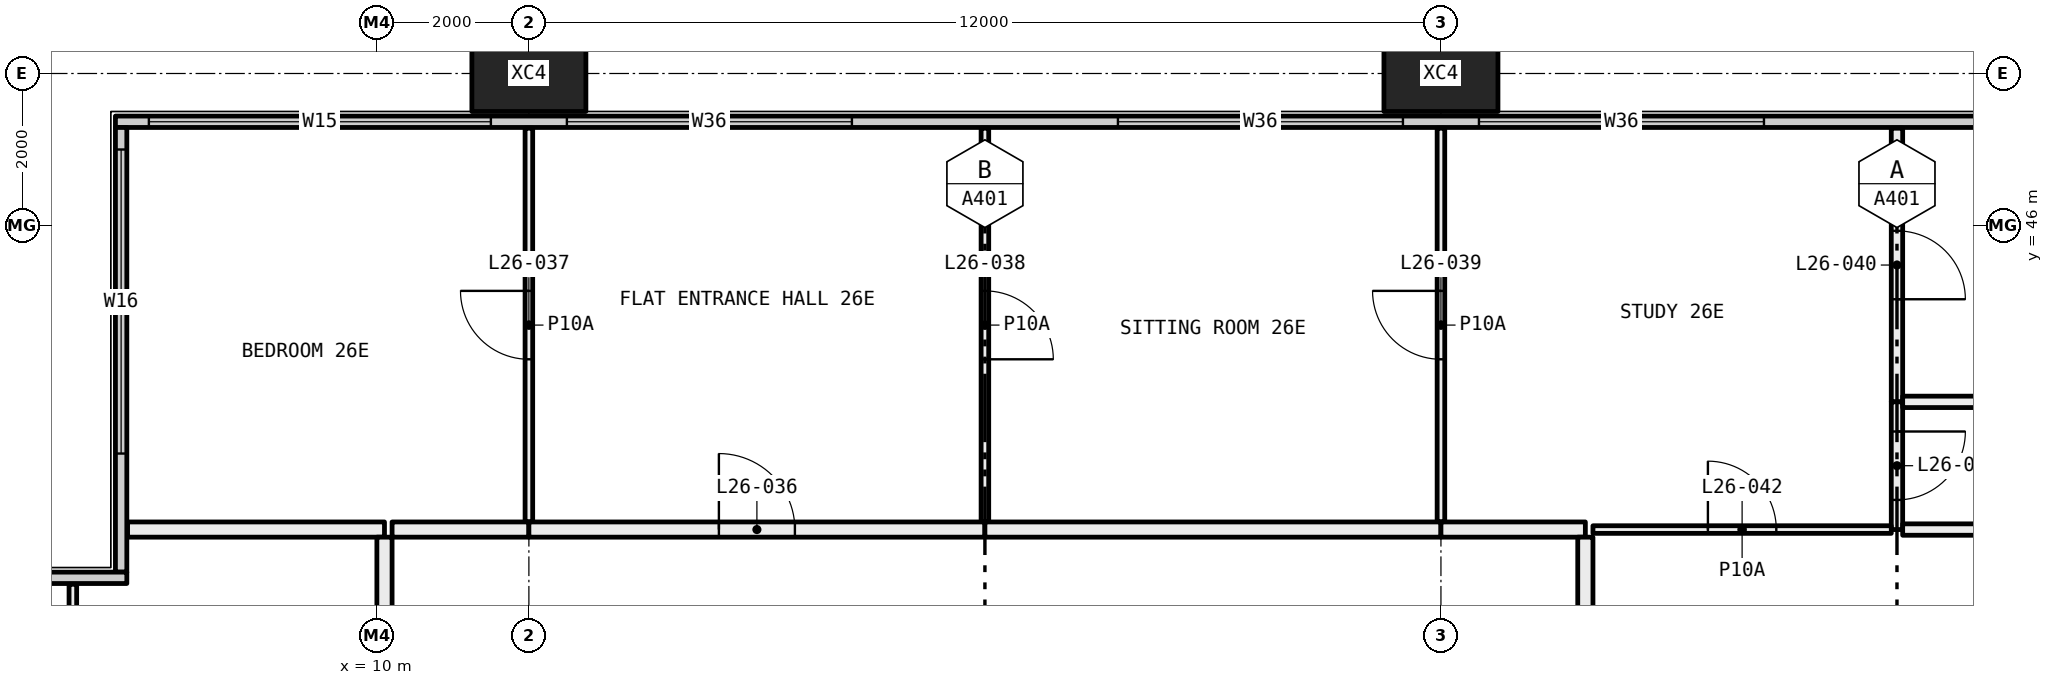
"""IFC4 building model, lengths in metres.
Left out: names, types, materials, properties, quantities, classifications, styles, units other than length and angle.
Written with IfcOpenShell. Run it as: python <this file> out.ifc"""

import sys

from ifc_helpers import new_model, si_unit, direction, frame, frame_2d, origin, origin_2d, place, context, subcontext, project, spatial, rectangle, hollow_rectangle, extrude, element, fill, save


model = new_model("IFC4")
c1 = context("Model", 3, precision=1e-05, world=origin(), true_north=direction((0.0, 1.0)))
c2 = subcontext(c1, "Body", "Model", "MODEL_VIEW")
j1 = project(units=[si_unit("LENGTHUNIT", "METRE"), si_unit("PLANEANGLEUNIT", "RADIAN")], contexts=[c1])
p1 = place(None, origin())
s1 = spatial("IfcSite", under=j1, at=p1, CompositionType="ELEMENT")
p2 = place(p1, origin())
s2 = spatial("IfcBuilding", under=s1, at=p2, CompositionType="ELEMENT")
p3 = place(p2, frame((0.0, 0.0, 103.5)))
s3 = spatial("IfcBuildingStorey", under=s2, at=p3, CompositionType="ELEMENT", Elevation=103.5)
for number, where, z_axis, x_axis in (
    (1, (12.0, 48.0, -0.4), (0.0, 0.0, 1.0), (1.0, 0.0, 0.0)),
    (2, (24.0, 48.0, -0.4), (0.0, 0.0, 1.0), (1.0, 0.0, 0.0)),
):
    element("IfcColumn", number, at=place(p3, frame(where, z_axis=z_axis, x_axis=x_axis)), inside=s3, PredefinedType="COLUMN", context=c2, shape_type="SweptSolid", body=[
        extrude(hollow_rectangle(XDim=1.5, YDim=1.0, WallThickness=0.06, at=origin_2d()), origin(), (0.0, 0.0, 1.0), 3.45),
    ])
p4 = place(p3, frame((6.56, 47.365, 0.0), z_axis=(0.0, 0.0, 1.0), x_axis=(1.0, 0.0, 0.0)))
e3 = element("IfcWall", 3, at=p4, inside=s3, PredefinedType="ELEMENTEDWALL", context=c2, shape_type="SweptSolid", body=[
    extrude(rectangle(XDim=58.88, YDim=0.15, at=frame_2d((29.44, 0.0))), origin(), (0.0, 0.0, 1.0), 3.05),
])
p5 = place(p4, frame((0.44, 0.0, 0.45)))
e4 = element("IfcOpeningElement", 4, at=p5, cuts=e3, PredefinedType="OPENING", context=c2, shape_type="SweptSolid", body=[
    extrude(rectangle(XDim=4.5, YDim=2.55, at=frame_2d((2.25, 1.275))), frame((0.0, 0.085, 0.0), z_axis=(0.0, -1.0, 0.0), x_axis=(1.0, 0.0, 0.0)), (0.0, 0.0, 1.0), 0.17),
])
p6 = place(p4, frame((5.94, 0.0, 0.45)))
e5 = element("IfcOpeningElement", 5, at=p6, cuts=e3, PredefinedType="OPENING", context=c2, shape_type="SweptSolid", body=[
    extrude(rectangle(XDim=3.75, YDim=2.55, at=frame_2d((1.875, 1.275))), frame((0.0, 0.085, 0.0), z_axis=(0.0, -1.0, 0.0), x_axis=(1.0, 0.0, 0.0)), (0.0, 0.0, 1.0), 0.17),
])
p7 = place(p4, frame((13.19, 0.0, 0.45)))
e6 = element("IfcOpeningElement", 6, at=p7, cuts=e3, PredefinedType="OPENING", context=c2, shape_type="SweptSolid", body=[
    extrude(rectangle(XDim=3.75, YDim=2.55, at=frame_2d((1.875, 1.275))), frame((0.0, 0.085, 0.0), z_axis=(0.0, -1.0, 0.0), x_axis=(1.0, 0.0, 0.0)), (0.0, 0.0, 1.0), 0.17),
])
p8 = place(p4, frame((17.94, 0.0, 0.45)))
e7 = element("IfcOpeningElement", 7, at=p8, cuts=e3, PredefinedType="OPENING", context=c2, shape_type="SweptSolid", body=[
    extrude(rectangle(XDim=3.75, YDim=2.55, at=frame_2d((1.875, 1.275))), frame((0.0, 0.085, 0.0), z_axis=(0.0, -1.0, 0.0), x_axis=(1.0, 0.0, 0.0)), (0.0, 0.0, 1.0), 0.17),
])
p9 = place(p4, frame((25.19, 0.0, 0.45)))
e8 = element("IfcOpeningElement", 8, at=p9, cuts=e3, PredefinedType="OPENING", context=c2, shape_type="SweptSolid", body=[
    extrude(rectangle(XDim=0.75, YDim=2.55, at=frame_2d((0.375, 1.275))), frame((0.0, 0.085, 0.0), z_axis=(0.0, -1.0, 0.0), x_axis=(1.0, 0.0, 0.0)), (0.0, 0.0, 1.0), 0.17),
])
p10 = place(p4, frame((26.94, 0.0, 0.45)))
e9 = element("IfcOpeningElement", 9, at=p10, cuts=e3, PredefinedType="OPENING", context=c2, shape_type="SweptSolid", body=[
    extrude(rectangle(XDim=2.0, YDim=2.55, at=frame_2d((1.0, 1.275))), frame((0.0, 0.085, 0.0), z_axis=(0.0, -1.0, 0.0), x_axis=(1.0, 0.0, 0.0)), (0.0, 0.0, 1.0), 0.17),
])
p11 = place(p4, frame((29.94, 0.0, 0.45)))
e10 = element("IfcOpeningElement", 10, at=p11, cuts=e3, PredefinedType="OPENING", context=c2, shape_type="SweptSolid", body=[
    extrude(rectangle(XDim=3.75, YDim=2.55, at=frame_2d((1.875, 1.275))), frame((0.0, 0.085, 0.0), z_axis=(0.0, -1.0, 0.0), x_axis=(1.0, 0.0, 0.0)), (0.0, 0.0, 1.0), 0.17),
])
p12 = place(p4, frame((37.19, 0.0, 0.45)))
e11 = element("IfcOpeningElement", 11, at=p12, cuts=e3, PredefinedType="OPENING", context=c2, shape_type="SweptSolid", body=[
    extrude(rectangle(XDim=3.75, YDim=2.55, at=frame_2d((1.875, 1.275))), frame((0.0, 0.085, 0.0), z_axis=(0.0, -1.0, 0.0), x_axis=(1.0, 0.0, 0.0)), (0.0, 0.0, 1.0), 0.17),
])
p13 = place(p4, frame((41.94, 0.0, 0.45)))
e12 = element("IfcOpeningElement", 12, at=p13, cuts=e3, PredefinedType="OPENING", context=c2, shape_type="SweptSolid", body=[
    extrude(rectangle(XDim=3.75, YDim=2.55, at=frame_2d((1.875, 1.275))), frame((0.0, 0.085, 0.0), z_axis=(0.0, -1.0, 0.0), x_axis=(1.0, 0.0, 0.0)), (0.0, 0.0, 1.0), 0.17),
])
p14 = place(p4, frame((49.19, 0.0, 0.45)))
e13 = element("IfcOpeningElement", 13, at=p14, cuts=e3, PredefinedType="OPENING", context=c2, shape_type="SweptSolid", body=[
    extrude(rectangle(XDim=0.75, YDim=2.55, at=frame_2d((0.375, 1.275))), frame((0.0, 0.085, 0.0), z_axis=(0.0, -1.0, 0.0), x_axis=(1.0, 0.0, 0.0)), (0.0, 0.0, 1.0), 0.17),
])
p15 = place(p4, frame((50.94, 0.0, 0.45)))
e14 = element("IfcOpeningElement", 14, at=p15, cuts=e3, PredefinedType="OPENING", context=c2, shape_type="SweptSolid", body=[
    extrude(rectangle(XDim=2.0, YDim=2.55, at=frame_2d((1.0, 1.275))), frame((0.0, 0.085, 0.0), z_axis=(0.0, -1.0, 0.0), x_axis=(1.0, 0.0, 0.0)), (0.0, 0.0, 1.0), 0.17),
])
p16 = place(p4, frame((53.94, 0.0, 0.45)))
e15 = element("IfcOpeningElement", 15, at=p16, cuts=e3, PredefinedType="OPENING", context=c2, shape_type="SweptSolid", body=[
    extrude(rectangle(XDim=4.5, YDim=2.55, at=frame_2d((2.25, 1.275))), frame((0.0, 0.085, 0.0), z_axis=(0.0, -1.0, 0.0), x_axis=(1.0, 0.0, 0.0)), (0.0, 0.0, 1.0), 0.17),
])
p17 = place(p3, frame((6.635, 41.44, 0.0), z_axis=(0.0, 0.0, 1.0), x_axis=(0.0, 1.0, 0.0)))
e16 = element("IfcWall", 16, at=p17, inside=s3, PredefinedType="ELEMENTEDWALL", context=c2, shape_type="SweptSolid", body=[
    extrude(rectangle(XDim=5.85, YDim=0.15, at=frame_2d((2.925, 0.0))), origin(), (0.0, 0.0, 1.0), 3.05),
])
p18 = place(p17, frame((1.56, 0.0, 0.45)))
e17 = element("IfcOpeningElement", 17, at=p18, cuts=e16, PredefinedType="OPENING", context=c2, shape_type="SweptSolid", body=[
    extrude(rectangle(XDim=4.0, YDim=2.55, at=frame_2d((2.0, 1.275))), frame((0.0, 0.085, 0.0), z_axis=(0.0, -1.0, 0.0), x_axis=(1.0, 0.0, 0.0)), (0.0, 0.0, 1.0), 0.17),
])
p19 = place(p3, frame((0.56, 41.365, 0.0), z_axis=(0.0, 0.0, 1.0), x_axis=(1.0, 0.0, 0.0)))
e18 = element("IfcWall", 18, at=p19, inside=s3, PredefinedType="ELEMENTEDWALL", context=c2, shape_type="SweptSolid", body=[
    extrude(rectangle(XDim=6.15, YDim=0.15, at=frame_2d((3.075, 0.0))), origin(), (0.0, 0.0, 1.0), 3.05),
])
p20 = place(p19, frame((0.44, 0.0, 0.45)))
e19 = element("IfcOpeningElement", 19, at=p20, cuts=e18, PredefinedType="OPENING", context=c2, shape_type="SweptSolid", body=[
    extrude(rectangle(XDim=4.0, YDim=2.55, at=frame_2d((2.0, 1.275))), frame((0.0, 0.085, 0.0), z_axis=(0.0, -1.0, 0.0), x_axis=(1.0, 0.0, 0.0)), (0.0, 0.0, 1.0), 0.17),
])
p21 = place(p3, frame((6.0, 37.5, 0.0), z_axis=(0.0, 0.0, 1.0), x_axis=(0.0, 1.0, 0.0)))
e20 = element("IfcWall", 20, at=p21, inside=s3, PredefinedType="PARTITIONING", context=c2, shape_type="SweptSolid", body=[
    extrude(rectangle(XDim=3.78, YDim=0.1, at=frame_2d((1.89, 0.0))), origin(), (0.0, 0.0, 1.0), 3.05),
])
p22 = place(p3, frame((10.1, 42.0, 0.0), z_axis=(0.0, 0.0, 1.0), x_axis=(-1.0, 0.0, 0.0)))
e21 = element("IfcWall", 21, at=p22, inside=s3, PredefinedType="PARTITIONING", context=c2, shape_type="SweptSolid", body=[
    extrude(rectangle(XDim=3.38, YDim=0.2, at=frame_2d((1.69, 0.0))), origin(), (0.0, 0.0, 1.0), 3.05),
])
p23 = place(p3, frame((10.1, 37.5, 0.0), z_axis=(0.0, 0.0, 1.0), x_axis=(0.0, 1.0, 0.0)))
e22 = element("IfcWall", 22, at=p23, inside=s3, PredefinedType="PARTITIONING", context=c2, shape_type="SweptSolid", body=[
    extrude(rectangle(XDim=4.4, YDim=0.2, at=frame_2d((2.2, 0.0))), origin(), (0.0, 0.0, 1.0), 3.05),
])
p24 = place(p3, frame((12.0, 42.1, 0.0), z_axis=(0.0, 0.0, 1.0), x_axis=(0.0, 1.0, 0.0)))
e23 = element("IfcWall", 23, at=p24, inside=s3, PredefinedType="PARTITIONING", context=c2, shape_type="SweptSolid", body=[
    extrude(rectangle(XDim=5.18, YDim=0.1, at=frame_2d((2.59, 0.0))), origin(), (0.0, 0.0, 1.0), 3.05),
])
p25 = place(p24, frame((2.14, 0.0, 0.0)))
e24 = element("IfcOpeningElement", 24, at=p25, cuts=e23, PredefinedType="OPENING", context=c2, shape_type="SweptSolid", body=[
    extrude(rectangle(XDim=0.9, YDim=2.1, at=frame_2d((0.45, 1.05))), frame((0.0, 0.06, 0.0), z_axis=(0.0, -1.0, 0.0), x_axis=(1.0, 0.0, 0.0)), (0.0, 0.0, 1.0), 0.12),
])
p26 = place(p3, frame((10.2, 42.0, 0.0), z_axis=(0.0, 0.0, 1.0), x_axis=(1.0, 0.0, 0.0)))
e25 = element("IfcWall", 25, at=p26, inside=s3, PredefinedType="PARTITIONING", context=c2, shape_type="SweptSolid", body=[
    extrude(rectangle(XDim=1.8, YDim=0.2, at=frame_2d((0.9, 0.0))), origin(), (0.0, 0.0, 1.0), 3.05),
])
p27 = place(p3, frame((18.0, 42.1, 0.0), z_axis=(0.0, 0.0, 1.0), x_axis=(0.0, 1.0, 0.0)))
e26 = element("IfcWall", 26, at=p27, inside=s3, PredefinedType="PARTITIONING", context=c2, shape_type="SweptSolid", body=[
    extrude(rectangle(XDim=5.18, YDim=0.1, at=frame_2d((2.59, 0.0))), origin(), (0.0, 0.0, 1.0), 3.05),
])
p28 = place(p27, frame((2.14, 0.0, 0.0)))
e27 = element("IfcOpeningElement", 27, at=p28, cuts=e26, PredefinedType="OPENING", context=c2, shape_type="SweptSolid", body=[
    extrude(rectangle(XDim=0.9, YDim=2.1, at=frame_2d((0.45, 1.05))), frame((0.0, 0.06, 0.0), z_axis=(0.0, -1.0, 0.0), x_axis=(1.0, 0.0, 0.0)), (0.0, 0.0, 1.0), 0.12),
])
p29 = place(p3, frame((12.0, 42.0, 0.0), z_axis=(0.0, 0.0, 1.0), x_axis=(1.0, 0.0, 0.0)))
e28 = element("IfcWall", 28, at=p29, inside=s3, PredefinedType="PARTITIONING", context=c2, shape_type="SweptSolid", body=[
    extrude(rectangle(XDim=6.0, YDim=0.2, at=frame_2d((3.0, 0.0))), origin(), (0.0, 0.0, 1.0), 3.05),
])
p30 = place(p29, frame((2.5, 0.0, 0.0)))
e29 = element("IfcOpeningElement", 29, at=p30, cuts=e28, PredefinedType="OPENING", context=c2, shape_type="SweptSolid", body=[
    extrude(rectangle(XDim=1.0, YDim=2.1, at=frame_2d((0.5, 1.05))), frame((0.0, 0.11, 0.0), z_axis=(0.0, -1.0, 0.0), x_axis=(1.0, 0.0, 0.0)), (0.0, 0.0, 1.0), 0.22),
])
p31 = place(p3, frame((24.0, 42.1, 0.0), z_axis=(0.0, 0.0, 1.0), x_axis=(0.0, 1.0, 0.0)))
e30 = element("IfcWall", 30, at=p31, inside=s3, PredefinedType="PARTITIONING", context=c2, shape_type="SweptSolid", body=[
    extrude(rectangle(XDim=5.18, YDim=0.1, at=frame_2d((2.59, 0.0))), origin(), (0.0, 0.0, 1.0), 3.05),
])
p32 = place(p31, frame((2.14, 0.0, 0.0)))
e31 = element("IfcOpeningElement", 31, at=p32, cuts=e30, PredefinedType="OPENING", context=c2, shape_type="SweptSolid", body=[
    extrude(rectangle(XDim=0.9, YDim=2.1, at=frame_2d((0.45, 1.05))), frame((0.0, 0.06, 0.0), z_axis=(0.0, -1.0, 0.0), x_axis=(1.0, 0.0, 0.0)), (0.0, 0.0, 1.0), 0.12),
])
p33 = place(p3, frame((18.0, 42.0, 0.0), z_axis=(0.0, 0.0, 1.0), x_axis=(1.0, 0.0, 0.0)))
e32 = element("IfcWall", 32, at=p33, inside=s3, PredefinedType="PARTITIONING", context=c2, shape_type="SweptSolid", body=[
    extrude(rectangle(XDim=6.0, YDim=0.2, at=frame_2d((3.0, 0.0))), origin(), (0.0, 0.0, 1.0), 3.05),
])
p34 = place(p3, frame((30.0, 43.68, 0.0), z_axis=(0.0, 0.0, 1.0), x_axis=(0.0, 1.0, 0.0)))
e33 = element("IfcWall", 33, at=p34, inside=s3, PredefinedType="PARTITIONING", context=c2, shape_type="SweptSolid", body=[
    extrude(rectangle(XDim=3.6, YDim=0.15, at=frame_2d((1.8, 0.0))), origin(), (0.0, 0.0, 1.0), 3.05),
])
p35 = place(p34, frame((1.35, 0.0, 0.0)))
e34 = element("IfcOpeningElement", 34, at=p35, cuts=e33, PredefinedType="OPENING", context=c2, shape_type="SweptSolid", body=[
    extrude(rectangle(XDim=0.9, YDim=2.1, at=frame_2d((0.45, 1.05))), frame((0.0, 0.085, 0.0), z_axis=(0.0, -1.0, 0.0), x_axis=(1.0, 0.0, 0.0)), (0.0, 0.0, 1.0), 0.17),
])
p36 = place(p3, frame((30.0, 42.0, 0.0), z_axis=(0.0, 0.0, 1.0), x_axis=(0.0, 1.0, 0.0)))
e35 = element("IfcWall", 35, at=p36, inside=s3, PredefinedType="PARTITIONING", context=c2, shape_type="SweptSolid", body=[
    extrude(rectangle(XDim=1.68, YDim=0.15, at=frame_2d((0.84, 0.0))), origin(), (0.0, 0.0, 1.0), 3.05),
])
p37 = place(p36, frame((0.39, 0.0, 0.0)))
e36 = element("IfcOpeningElement", 36, at=p37, cuts=e35, PredefinedType="OPENING", context=c2, shape_type="SweptSolid", body=[
    extrude(rectangle(XDim=0.9, YDim=2.1, at=frame_2d((0.45, 1.05))), frame((0.0, 0.085, 0.0), z_axis=(0.0, -1.0, 0.0), x_axis=(1.0, 0.0, 0.0)), (0.0, 0.0, 1.0), 0.17),
])
p38 = place(p3, frame((26.0, 42.0, 0.0), z_axis=(0.0, 0.0, 1.0), x_axis=(1.0, 0.0, 0.0)))
e37 = element("IfcWall", 37, at=p38, inside=s3, PredefinedType="PARTITIONING", context=c2, shape_type="SweptSolid", body=[
    extrude(rectangle(XDim=3.925, YDim=0.1, at=frame_2d((1.962, 0.0))), origin(), (0.0, 0.0, 1.0), 3.05),
])
p39 = place(p38, frame((1.512, 0.0, 0.0)))
e38 = element("IfcOpeningElement", 38, at=p39, cuts=e37, PredefinedType="OPENING", context=c2, shape_type="SweptSolid", body=[
    extrude(rectangle(XDim=0.9, YDim=2.1, at=frame_2d((0.45, 1.05))), frame((0.0, 0.06, 0.0), z_axis=(0.0, -1.0, 0.0), x_axis=(1.0, 0.0, 0.0)), (0.0, 0.0, 1.0), 0.12),
])
p40 = place(p3, frame((24.0, 42.0, 0.0), z_axis=(0.0, 0.0, 1.0), x_axis=(1.0, 0.0, 0.0)))
e39 = element("IfcWall", 39, at=p40, inside=s3, PredefinedType="PARTITIONING", context=c2, shape_type="SweptSolid", body=[
    extrude(rectangle(XDim=1.9, YDim=0.2, at=frame_2d((0.95, 0.0))), origin(), (0.0, 0.0, 1.0), 3.05),
])
p41 = place(p3, frame((30.075, 43.68, 0.0), z_axis=(0.0, 0.0, 1.0), x_axis=(1.0, 0.0, 0.0)))
e40 = element("IfcWall", 40, at=p41, inside=s3, PredefinedType="PARTITIONING", context=c2, shape_type="SweptSolid", body=[
    extrude(rectangle(XDim=5.925, YDim=0.15, at=frame_2d((2.962, 0.0))), origin(), (0.0, 0.0, 1.0), 2.45),
])
p42 = place(p3, frame((30.075, 42.0, 0.0), z_axis=(0.0, 0.0, 1.0), x_axis=(1.0, 0.0, 0.0)))
e41 = element("IfcWall", 41, at=p42, inside=s3, PredefinedType="PARTITIONING", context=c2, shape_type="SweptSolid", body=[
    extrude(rectangle(XDim=1.425, YDim=0.15, at=frame_2d((0.712, 0.0))), origin(), (0.0, 0.0, 1.0), 3.05),
])
p43 = place(p3, frame((25.9, 41.9, 0.0), z_axis=(0.0, 0.0, 1.0), x_axis=(0.0, -1.0, 0.0)))
e42 = element("IfcWall", 42, at=p43, inside=s3, PredefinedType="PARTITIONING", context=c2, shape_type="SweptSolid", body=[
    extrude(rectangle(XDim=6.2, YDim=0.2, at=frame_2d((3.1, 0.0))), origin(), (0.0, 0.0, 1.0), 2.45),
])
p44 = place(p5, origin())
e43 = element("IfcWindow", 43, at=p44, inside=s3, PartitioningType="SINGLE_PANEL", PredefinedType="WINDOW", context=c2, shape_type="SweptSolid", body=[
    extrude(rectangle(XDim=4.5, YDim=2.55, at=frame_2d((2.25, 1.275))), frame((0.0, 0.03, 0.0), z_axis=(0.0, -1.0, 0.0), x_axis=(1.0, 0.0, 0.0)), (0.0, 0.0, 1.0), 0.06),
])
fill(e4, e43)
p45 = place(p6, origin())
e44 = element("IfcWindow", 44, at=p45, inside=s3, PartitioningType="SINGLE_PANEL", PredefinedType="WINDOW", context=c2, shape_type="SweptSolid", body=[
    extrude(rectangle(XDim=3.75, YDim=2.55, at=frame_2d((1.875, 1.275))), frame((0.0, 0.03, 0.0), z_axis=(0.0, -1.0, 0.0), x_axis=(1.0, 0.0, 0.0)), (0.0, 0.0, 1.0), 0.06),
])
fill(e5, e44)
p46 = place(p7, origin())
e45 = element("IfcWindow", 45, at=p46, inside=s3, PartitioningType="SINGLE_PANEL", PredefinedType="WINDOW", context=c2, shape_type="SweptSolid", body=[
    extrude(rectangle(XDim=3.75, YDim=2.55, at=frame_2d((1.875, 1.275))), frame((0.0, 0.03, 0.0), z_axis=(0.0, -1.0, 0.0), x_axis=(1.0, 0.0, 0.0)), (0.0, 0.0, 1.0), 0.06),
])
fill(e6, e45)
p47 = place(p8, origin())
e46 = element("IfcWindow", 46, at=p47, inside=s3, PartitioningType="SINGLE_PANEL", PredefinedType="WINDOW", context=c2, shape_type="SweptSolid", body=[
    extrude(rectangle(XDim=3.75, YDim=2.55, at=frame_2d((1.875, 1.275))), frame((0.0, 0.03, 0.0), z_axis=(0.0, -1.0, 0.0), x_axis=(1.0, 0.0, 0.0)), (0.0, 0.0, 1.0), 0.06),
])
fill(e7, e46)
p48 = place(p18, origin())
e47 = element("IfcWindow", 47, at=p48, inside=s3, PartitioningType="SINGLE_PANEL", PredefinedType="WINDOW", context=c2, shape_type="SweptSolid", body=[
    extrude(rectangle(XDim=4.0, YDim=2.55, at=frame_2d((2.0, 1.275))), frame((0.0, 0.03, 0.0), z_axis=(0.0, -1.0, 0.0), x_axis=(1.0, 0.0, 0.0)), (0.0, 0.0, 1.0), 0.06),
])
fill(e17, e47)
p49 = place(p30, origin())
e48 = element("IfcDoor", 48, at=p49, inside=s3, OperationType="SINGLE_SWING_RIGHT", PredefinedType="DOOR", context=c2, shape_type="SweptSolid", body=[
    extrude(rectangle(XDim=1.0, YDim=2.1, at=frame_2d((0.5, 1.05))), frame((0.0, 0.025, 0.0), z_axis=(0.0, -1.0, 0.0), x_axis=(1.0, 0.0, 0.0)), (0.0, 0.0, 1.0), 0.05),
])
fill(e29, e48)
p50 = place(p25, origin())
e49 = element("IfcDoor", 49, at=p50, inside=s3, OperationType="SINGLE_SWING_LEFT", PredefinedType="DOOR", context=c2, shape_type="SweptSolid", body=[
    extrude(rectangle(XDim=0.9, YDim=2.1, at=frame_2d((0.45, 1.05))), frame((0.0, 0.025, 0.0), z_axis=(0.0, -1.0, 0.0), x_axis=(1.0, 0.0, 0.0)), (0.0, 0.0, 1.0), 0.05),
])
fill(e24, e49)
p51 = place(p28, frame((0.9, 0.0, 0.0), x_axis=(-1.0, 0.0, 0.0)))
e50 = element("IfcDoor", 50, at=p51, inside=s3, OperationType="SINGLE_SWING_LEFT", PredefinedType="DOOR", context=c2, shape_type="SweptSolid", body=[
    extrude(rectangle(XDim=0.9, YDim=2.1, at=frame_2d((0.45, 1.05))), frame((0.0, 0.025, 0.0), z_axis=(0.0, -1.0, 0.0), x_axis=(1.0, 0.0, 0.0)), (0.0, 0.0, 1.0), 0.05),
])
fill(e27, e50)
p52 = place(p32, origin())
e51 = element("IfcDoor", 51, at=p52, inside=s3, OperationType="SINGLE_SWING_LEFT", PredefinedType="DOOR", context=c2, shape_type="SweptSolid", body=[
    extrude(rectangle(XDim=0.9, YDim=2.1, at=frame_2d((0.45, 1.05))), frame((0.0, 0.025, 0.0), z_axis=(0.0, -1.0, 0.0), x_axis=(1.0, 0.0, 0.0)), (0.0, 0.0, 1.0), 0.05),
])
fill(e31, e51)
p53 = place(p35, frame((0.9, 0.0, 0.0), x_axis=(-1.0, 0.0, 0.0)))
e52 = element("IfcDoor", 52, at=p53, inside=s3, OperationType="SINGLE_SWING_LEFT", PredefinedType="DOOR", context=c2, shape_type="SweptSolid", body=[
    extrude(rectangle(XDim=0.9, YDim=2.1, at=frame_2d((0.45, 1.05))), frame((0.0, 0.025, 0.0), z_axis=(0.0, -1.0, 0.0), x_axis=(1.0, 0.0, 0.0)), (0.0, 0.0, 1.0), 0.05),
])
fill(e34, e52)
p54 = place(p37, frame((0.9, 0.0, 0.0), x_axis=(-1.0, 0.0, 0.0)))
e53 = element("IfcDoor", 53, at=p54, inside=s3, OperationType="SINGLE_SWING_RIGHT", PredefinedType="DOOR", context=c2, shape_type="SweptSolid", body=[
    extrude(rectangle(XDim=0.9, YDim=2.1, at=frame_2d((0.45, 1.05))), frame((0.0, 0.025, 0.0), z_axis=(0.0, -1.0, 0.0), x_axis=(1.0, 0.0, 0.0)), (0.0, 0.0, 1.0), 0.05),
])
fill(e36, e53)
p55 = place(p39, origin())
e54 = element("IfcDoor", 54, at=p55, inside=s3, OperationType="SINGLE_SWING_RIGHT", PredefinedType="DOOR", context=c2, shape_type="SweptSolid", body=[
    extrude(rectangle(XDim=0.9, YDim=2.1, at=frame_2d((0.45, 1.05))), frame((0.0, 0.025, 0.0), z_axis=(0.0, -1.0, 0.0), x_axis=(1.0, 0.0, 0.0)), (0.0, 0.0, 1.0), 0.05),
])
fill(e38, e54)
save(model, sys.argv[1])
